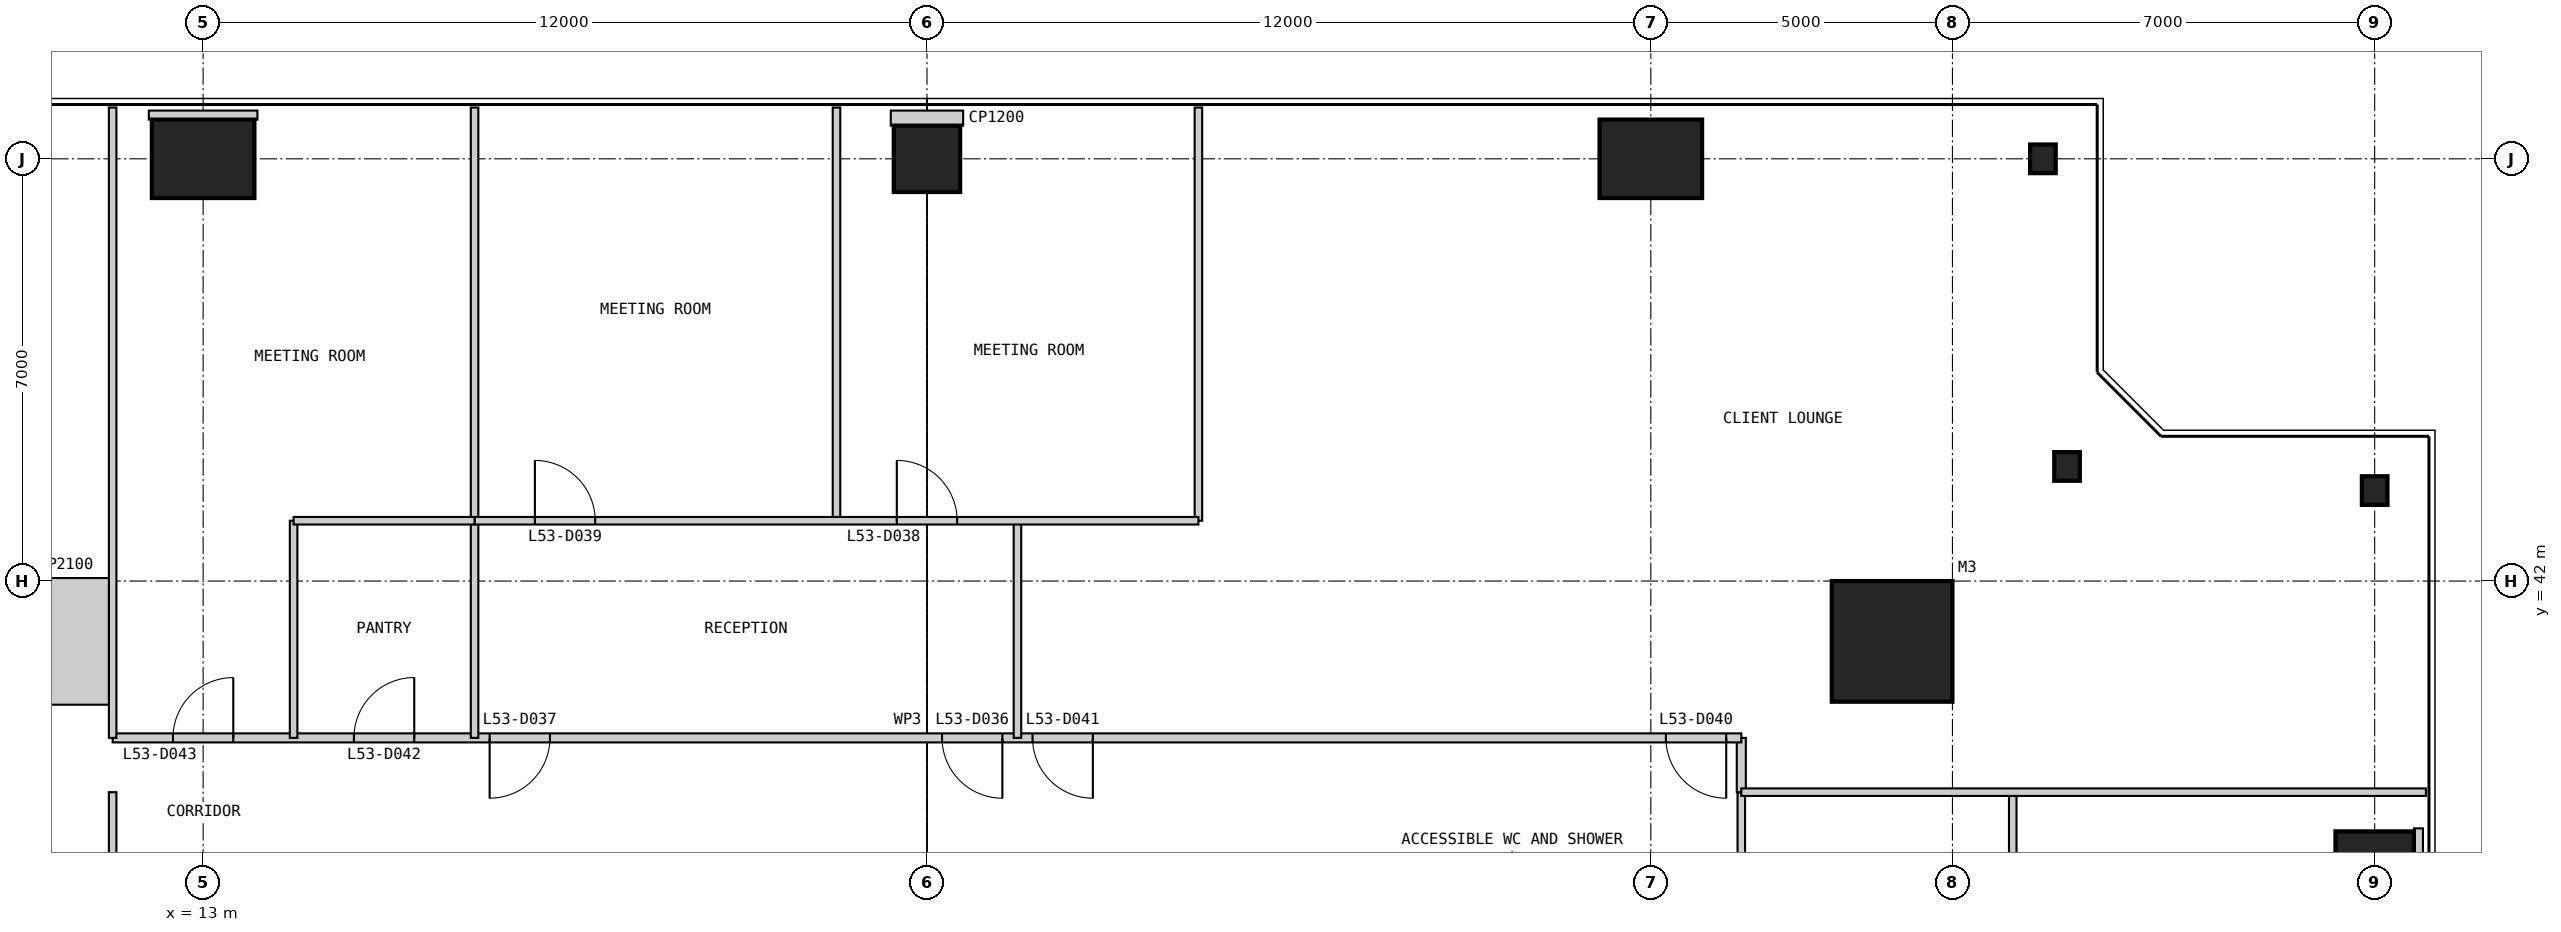
"""IFC4 building model, lengths in metres.
Left out: names, types, materials, properties, quantities, classifications, styles, units other than length and angle.
Written with IfcOpenShell. Run it as: python <this file> out.ifc"""

import sys

from ifc_helpers import new_model, si_unit, direction, frame, frame_2d, origin, origin_2d, place, context, subcontext, project, spatial, rectangle, i_section, extrude, element, fill, save


model = new_model("IFC4")
c1 = context("Model", 3, precision=1e-05, world=origin(), true_north=direction((0.0, 1.0)))
c2 = subcontext(c1, "Body", "Model", "MODEL_VIEW")
j1 = project(units=[si_unit("LENGTHUNIT", "METRE"), si_unit("PLANEANGLEUNIT", "RADIAN")], contexts=[c1])
p1 = place(None, origin())
s1 = spatial("IfcSite", under=j1, at=p1, CompositionType="ELEMENT")
p2 = place(p1, origin())
s2 = spatial("IfcBuilding", under=s1, at=p2, CompositionType="ELEMENT")
p3 = place(p2, frame((0.0, 0.0, 225.8)))
s3 = spatial("IfcBuildingStorey", under=s2, at=p3, CompositionType="ELEMENT", Elevation=225.8)
p4 = place(p3, frame((41.0, 41.0, 0.0), z_axis=(0.0, 0.0, 1.0), x_axis=(1.0, 0.0, 0.0)))
e1 = element("IfcColumn", 1, at=p4, inside=s3, PredefinedType="COLUMN", context=c2, shape_type="SweptSolid", body=[
    extrude(rectangle(XDim=2.0, YDim=2.0, at=origin_2d()), origin(), (0.0, 0.0, 1.0), 4.0),
])
p5 = place(p3, frame((49.0, 37.0, 0.0), z_axis=(0.0, 0.0, 1.0), x_axis=(1.0, 0.0, 0.0)))
e2 = element("IfcColumn", 2, at=p5, inside=s3, PredefinedType="COLUMN", context=c2, shape_type="SweptSolid", body=[
    extrude(rectangle(XDim=1.3, YDim=1.7, at=origin_2d()), origin(), (0.0, 0.0, 1.0), 4.0),
])
for number, where, z_axis, x_axis in (
    (3, (49.0, 43.5, 0.0), (0.0, 0.0, 1.0), (1.0, 0.0, 0.0)),
    (4, (43.9, 43.9, 0.0), (0.0, 0.0, 1.0), (1.0, 0.0, 0.0)),
    (5, (43.5, 49.0, 0.0), (0.0, 0.0, 1.0), (1.0, 0.0, 0.0)),
):
    element("IfcColumn", number, at=place(p3, frame(where, z_axis=z_axis, x_axis=x_axis)), inside=s3, PredefinedType="COLUMN", context=c2, shape_type="SweptSolid", body=[
        extrude(i_section(OverallWidth=0.424, OverallDepth=0.475, WebThickness=0.048, FlangeThickness=0.077, at=origin_2d()), origin(), (0.0, 0.0, 1.0), 4.0),
    ])
p6 = place(p3, frame((37.0, 49.0, 0.0), z_axis=(0.0, 0.0, 1.0), x_axis=(1.0, 0.0, 0.0)))
e6 = element("IfcColumn", 6, at=p6, inside=s3, PredefinedType="COLUMN", context=c2, shape_type="SweptSolid", body=[
    extrude(rectangle(XDim=1.7, YDim=1.3, at=origin_2d()), origin(), (0.0, 0.0, 1.0), 4.0),
])
p7 = place(p3, frame((25.0, 49.0, 0.0), z_axis=(0.0, 0.0, 1.0), x_axis=(1.0, 0.0, 0.0)))
e7 = element("IfcColumn", 7, at=p7, inside=s3, PredefinedType="COLUMN", context=c2, shape_type="SweptSolid", body=[
    extrude(rectangle(XDim=1.1, YDim=1.1, at=origin_2d()), origin(), (0.0, 0.0, 1.0), 4.0),
])
p8 = place(p3, frame((13.0, 49.0, 0.0), z_axis=(0.0, 0.0, 1.0), x_axis=(1.0, 0.0, 0.0)))
e8 = element("IfcColumn", 8, at=p8, inside=s3, PredefinedType="COLUMN", context=c2, shape_type="SweptSolid", body=[
    extrude(rectangle(XDim=1.7, YDim=1.3, at=origin_2d()), origin(), (0.0, 0.0, 1.0), 4.0),
])
p9 = place(p3, frame((43.0, 14.5, 0.0), z_axis=(0.0, 0.0, 1.0), x_axis=(0.0, 1.0, 0.0)))
e9 = element("IfcWall", 9, at=p9, inside=s3, PredefinedType="PARTITIONING", context=c2, shape_type="SweptSolid", body=[
    extrude(rectangle(XDim=24.0, YDim=0.125, at=frame_2d((12.0, 0.0))), origin(), (0.0, 0.0, 1.0), 3.238),
])
p10 = place(p9, frame((4.05, 0.0, 0.0)))
e10 = element("IfcOpeningElement", 10, at=p10, cuts=e9, PredefinedType="OPENING", context=c2, shape_type="SweptSolid", body=[
    extrude(rectangle(XDim=0.9, YDim=2.2, at=frame_2d((0.45, 1.1))), frame((0.0, 0.073, 0.0), z_axis=(0.0, -1.0, 0.0), x_axis=(1.0, 0.0, 0.0)), (0.0, 0.0, 1.0), 0.145),
])
p11 = place(p9, frame((10.05, 0.0, 0.0)))
e11 = element("IfcOpeningElement", 11, at=p11, cuts=e9, PredefinedType="OPENING", context=c2, shape_type="SweptSolid", body=[
    extrude(rectangle(XDim=0.9, YDim=2.2, at=frame_2d((0.45, 1.1))), frame((0.0, 0.073, 0.0), z_axis=(0.0, -1.0, 0.0), x_axis=(1.0, 0.0, 0.0)), (0.0, 0.0, 1.0), 0.145),
])
p12 = place(p9, frame((16.05, 0.0, 0.0)))
e12 = element("IfcOpeningElement", 12, at=p12, cuts=e9, PredefinedType="OPENING", context=c2, shape_type="SweptSolid", body=[
    extrude(rectangle(XDim=0.9, YDim=2.2, at=frame_2d((0.45, 1.1))), frame((0.0, 0.073, 0.0), z_axis=(0.0, -1.0, 0.0), x_axis=(1.0, 0.0, 0.0)), (0.0, 0.0, 1.0), 0.145),
])
p13 = place(p9, frame((19.05, 0.0, 0.0)))
e13 = element("IfcOpeningElement", 13, at=p13, cuts=e9, PredefinedType="OPENING", context=c2, shape_type="SweptSolid", body=[
    extrude(rectangle(XDim=0.9, YDim=2.2, at=frame_2d((0.45, 1.1))), frame((0.0, 0.073, 0.0), z_axis=(0.0, -1.0, 0.0), x_axis=(1.0, 0.0, 0.0)), (0.0, 0.0, 1.0), 0.145),
])
p14 = place(p3, frame((38.5, 35.5, 0.0), z_axis=(0.0, 0.0, 1.0), x_axis=(0.0, 1.0, 0.0)))
e14 = element("IfcWall", 14, at=p14, inside=s3, PredefinedType="PARTITIONING", context=c2, shape_type="SweptSolid", body=[
    extrude(rectangle(XDim=3.0, YDim=0.125, at=frame_2d((1.5, 0.0))), origin(), (0.0, 0.0, 1.0), 3.85),
])
p15 = place(p3, frame((38.5, 38.5, 0.0), z_axis=(0.0, 0.0, 1.0), x_axis=(0.0, 1.0, 0.0)))
e15 = element("IfcWall", 15, at=p15, inside=s3, PredefinedType="PARTITIONING", context=c2, shape_type="SweptSolid", body=[
    extrude(rectangle(XDim=0.9, YDim=0.15, at=frame_2d((0.45, 0.0))), origin(), (0.0, 0.0, 1.0), 3.85),
])
p16 = place(p3, frame((38.5, 39.4, 0.0), z_axis=(0.0, 0.0, 1.0), x_axis=(-1.0, 0.0, 0.0)))
e16 = element("IfcWall", 16, at=p16, inside=s3, PredefinedType="PARTITIONING", context=c2, shape_type="SweptSolid", body=[
    extrude(rectangle(XDim=27.0, YDim=0.15, at=frame_2d((13.5, 0.0))), origin(), (0.0, 0.0, 1.0), 3.85),
])
p17 = place(p16, frame((12.25, 0.0, 0.0)))
e17 = element("IfcOpeningElement", 17, at=p17, cuts=e16, PredefinedType="OPENING", context=c2, shape_type="SweptSolid", body=[
    extrude(rectangle(XDim=1.0, YDim=2.2, at=frame_2d((0.5, 1.1))), frame((0.0, 0.085, 0.0), z_axis=(0.0, -1.0, 0.0), x_axis=(1.0, 0.0, 0.0)), (0.0, 0.0, 1.0), 0.17),
])
p18 = place(p16, frame((19.75, 0.0, 0.0)))
e18 = element("IfcOpeningElement", 18, at=p18, cuts=e16, PredefinedType="OPENING", context=c2, shape_type="SweptSolid", body=[
    extrude(rectangle(XDim=1.0, YDim=2.2, at=frame_2d((0.5, 1.1))), frame((0.0, 0.085, 0.0), z_axis=(0.0, -1.0, 0.0), x_axis=(1.0, 0.0, 0.0)), (0.0, 0.0, 1.0), 0.17),
])
p19 = place(p16, frame((0.25, 0.0, 0.0)))
e19 = element("IfcOpeningElement", 19, at=p19, cuts=e16, PredefinedType="OPENING", context=c2, shape_type="SweptSolid", body=[
    extrude(rectangle(XDim=1.0, YDim=2.2, at=frame_2d((0.5, 1.1))), frame((0.0, 0.085, 0.0), z_axis=(0.0, -1.0, 0.0), x_axis=(1.0, 0.0, 0.0)), (0.0, 0.0, 1.0), 0.17),
])
p20 = place(p16, frame((10.75, 0.0, 0.0)))
e20 = element("IfcOpeningElement", 20, at=p20, cuts=e16, PredefinedType="OPENING", context=c2, shape_type="SweptSolid", body=[
    extrude(rectangle(XDim=1.0, YDim=2.2, at=frame_2d((0.5, 1.1))), frame((0.0, 0.085, 0.0), z_axis=(0.0, -1.0, 0.0), x_axis=(1.0, 0.0, 0.0)), (0.0, 0.0, 1.0), 0.17),
])
p21 = place(p16, frame((22.0, 0.0, 0.0)))
e21 = element("IfcOpeningElement", 21, at=p21, cuts=e16, PredefinedType="OPENING", context=c2, shape_type="SweptSolid", body=[
    extrude(rectangle(XDim=1.0, YDim=2.2, at=frame_2d((0.5, 1.1))), frame((0.0, 0.085, 0.0), z_axis=(0.0, -1.0, 0.0), x_axis=(1.0, 0.0, 0.0)), (0.0, 0.0, 1.0), 0.17),
])
p22 = place(p16, frame((25.0, 0.0, 0.0)))
e22 = element("IfcOpeningElement", 22, at=p22, cuts=e16, PredefinedType="OPENING", context=c2, shape_type="SweptSolid", body=[
    extrude(rectangle(XDim=1.0, YDim=2.2, at=frame_2d((0.5, 1.1))), frame((0.0, 0.085, 0.0), z_axis=(0.0, -1.0, 0.0), x_axis=(1.0, 0.0, 0.0)), (0.0, 0.0, 1.0), 0.17),
])
p23 = place(p3, frame((49.85, 38.5, 0.0), z_axis=(0.0, 0.0, 1.0), x_axis=(-1.0, 0.0, 0.0)))
e23 = element("IfcWall", 23, at=p23, inside=s3, PredefinedType="PARTITIONING", context=c2, shape_type="SweptSolid", body=[
    extrude(rectangle(XDim=11.35, YDim=0.125, at=frame_2d((5.675, 0.0))), origin(), (0.0, 0.0, 1.0), 3.85),
])
p24 = place(p3, frame((29.5, 49.85, 0.0), z_axis=(0.0, 0.0, 1.0), x_axis=(0.0, -1.0, 0.0)))
e24 = element("IfcWall", 24, at=p24, inside=s3, PredefinedType="PARTITIONING", context=c2, shape_type="SweptSolid", body=[
    extrude(rectangle(XDim=6.85, YDim=0.125, at=frame_2d((3.425, 0.0))), origin(), (0.0, 0.0, 1.0), 3.85),
])
p25 = place(p3, frame((26.5, 43.0, 0.0), z_axis=(0.0, 0.0, 1.0), x_axis=(0.0, -1.0, 0.0)))
e25 = element("IfcWall", 25, at=p25, inside=s3, PredefinedType="PARTITIONING", context=c2, shape_type="SweptSolid", body=[
    extrude(rectangle(XDim=3.6, YDim=0.125, at=frame_2d((1.8, 0.0))), origin(), (0.0, 0.0, 1.0), 3.85),
])
p26 = place(p3, frame((23.5, 49.85, 0.0), z_axis=(0.0, 0.0, 1.0), x_axis=(0.0, -1.0, 0.0)))
e26 = element("IfcWall", 26, at=p26, inside=s3, PredefinedType="PARTITIONING", context=c2, shape_type="SweptSolid", body=[
    extrude(rectangle(XDim=6.85, YDim=0.125, at=frame_2d((3.425, 0.0))), origin(), (0.0, 0.0, 1.0), 3.85),
])
p27 = place(p3, frame((17.5, 49.85, 0.0), z_axis=(0.0, 0.0, 1.0), x_axis=(0.0, -1.0, 0.0)))
e27 = element("IfcWall", 27, at=p27, inside=s3, PredefinedType="PARTITIONING", context=c2, shape_type="SweptSolid", body=[
    extrude(rectangle(XDim=10.45, YDim=0.125, at=frame_2d((5.225, 0.0))), origin(), (0.0, 0.0, 1.0), 3.85),
])
p28 = place(p3, frame((14.5, 43.0, 0.0), z_axis=(0.0, 0.0, 1.0), x_axis=(0.0, -1.0, 0.0)))
e28 = element("IfcWall", 28, at=p28, inside=s3, PredefinedType="PARTITIONING", context=c2, shape_type="SweptSolid", body=[
    extrude(rectangle(XDim=3.6, YDim=0.125, at=frame_2d((1.8, 0.0))), origin(), (0.0, 0.0, 1.0), 3.85),
])
p29 = place(p3, frame((29.5, 43.0, 0.0), z_axis=(0.0, 0.0, 1.0), x_axis=(-1.0, 0.0, 0.0)))
e29 = element("IfcWall", 29, at=p29, inside=s3, PredefinedType="PARTITIONING", context=c2, shape_type="SweptSolid", body=[
    extrude(rectangle(XDim=12.0, YDim=0.125, at=frame_2d((6.0, 0.0))), origin(), (0.0, 0.0, 1.0), 3.85),
])
p30 = place(p29, frame((4.0, 0.0, 0.0)))
e30 = element("IfcOpeningElement", 30, at=p30, cuts=e29, PredefinedType="OPENING", context=c2, shape_type="SweptSolid", body=[
    extrude(rectangle(XDim=1.0, YDim=2.2, at=frame_2d((0.5, 1.1))), frame((0.0, 0.073, 0.0), z_axis=(0.0, -1.0, 0.0), x_axis=(1.0, 0.0, 0.0)), (0.0, 0.0, 1.0), 0.145),
])
p31 = place(p29, frame((10.0, 0.0, 0.0)))
e31 = element("IfcOpeningElement", 31, at=p31, cuts=e29, PredefinedType="OPENING", context=c2, shape_type="SweptSolid", body=[
    extrude(rectangle(XDim=1.0, YDim=2.2, at=frame_2d((0.5, 1.1))), frame((0.0, 0.073, 0.0), z_axis=(0.0, -1.0, 0.0), x_axis=(1.0, 0.0, 0.0)), (0.0, 0.0, 1.0), 0.145),
])
p32 = place(p3, frame((17.5, 43.0, 0.0), z_axis=(0.0, 0.0, 1.0), x_axis=(-1.0, 0.0, 0.0)))
e32 = element("IfcWall", 32, at=p32, inside=s3, PredefinedType="PARTITIONING", context=c2, shape_type="SweptSolid", body=[
    extrude(rectangle(XDim=3.0, YDim=0.125, at=frame_2d((1.5, 0.0))), origin(), (0.0, 0.0, 1.0), 3.85),
])
p33 = place(p3, frame((11.5, 49.85, 0.0), z_axis=(0.0, 0.0, 1.0), x_axis=(0.0, -1.0, 0.0)))
e33 = element("IfcWall", 33, at=p33, inside=s3, PredefinedType="PARTITIONING", context=c2, shape_type="SweptSolid", body=[
    extrude(rectangle(XDim=10.45, YDim=0.125, at=frame_2d((5.225, 0.0))), origin(), (0.0, 0.0, 1.0), 3.85),
])
p34 = place(p3, frame((11.5, 38.5, 0.0), z_axis=(0.0, 0.0, 1.0), x_axis=(0.0, -1.0, 0.0)))
e34 = element("IfcWall", 34, at=p34, inside=s3, PredefinedType="PARTITIONING", context=c2, shape_type="SweptSolid", body=[
    extrude(rectangle(XDim=3.0, YDim=0.125, at=frame_2d((1.5, 0.0))), origin(), (0.0, 0.0, 1.0), 3.85),
])
p35 = place(p3, frame((49.8, 37.0, 0.0), z_axis=(0.0, 0.0, 1.0), x_axis=(-1.0, 0.0, 0.0)))
e35 = element("IfcWall", 35, at=p35, inside=s3, PredefinedType="PARTITIONING", context=c2, shape_type="SweptSolid", body=[
    extrude(rectangle(XDim=0.15, YDim=1.8, at=frame_2d((0.075, 0.0))), origin(), (0.0, 0.0, 1.0), 3.85),
])
p36 = place(p3, frame((25.0, 49.8, 0.0), z_axis=(0.0, 0.0, 1.0), x_axis=(0.0, -1.0, 0.0)))
e36 = element("IfcWall", 36, at=p36, inside=s3, PredefinedType="PARTITIONING", context=c2, shape_type="SweptSolid", body=[
    extrude(rectangle(XDim=0.25, YDim=1.2, at=frame_2d((0.125, 0.0))), origin(), (0.0, 0.0, 1.0), 3.85),
])
p37 = place(p3, frame((13.0, 49.8, 0.0), z_axis=(0.0, 0.0, 1.0), x_axis=(0.0, -1.0, 0.0)))
e37 = element("IfcWall", 37, at=p37, inside=s3, PredefinedType="PARTITIONING", context=c2, shape_type="SweptSolid", body=[
    extrude(rectangle(XDim=0.15, YDim=1.8, at=frame_2d((0.075, 0.0))), origin(), (0.0, 0.0, 1.0), 3.85),
])
p38 = place(p3, frame((11.438, 41.0, 0.0), z_axis=(0.0, 0.0, 1.0), x_axis=(-1.0, 0.0, 0.0)))
e38 = element("IfcWall", 38, at=p38, inside=s3, PredefinedType="PARTITIONING", context=c2, shape_type="SweptSolid", body=[
    extrude(rectangle(XDim=1.438, YDim=2.1, at=frame_2d((0.719, 0.0))), origin(), (0.0, 0.0, 1.0), 3.85),
])
p39 = place(p17, origin())
e39 = element("IfcDoor", 39, at=p39, inside=s3, OperationType="SINGLE_SWING_LEFT", PredefinedType="DOOR", context=c2, shape_type="SweptSolid", body=[
    extrude(rectangle(XDim=1.0, YDim=2.2, at=frame_2d((0.5, 1.1))), frame((0.0, 0.025, 0.0), z_axis=(0.0, -1.0, 0.0), x_axis=(1.0, 0.0, 0.0)), (0.0, 0.0, 1.0), 0.05),
])
fill(e17, e39)
p40 = place(p18, origin())
e40 = element("IfcDoor", 40, at=p40, inside=s3, OperationType="SINGLE_SWING_RIGHT", PredefinedType="DOOR", context=c2, shape_type="SweptSolid", body=[
    extrude(rectangle(XDim=1.0, YDim=2.2, at=frame_2d((0.5, 1.1))), frame((0.0, 0.025, 0.0), z_axis=(0.0, -1.0, 0.0), x_axis=(1.0, 0.0, 0.0)), (0.0, 0.0, 1.0), 0.05),
])
fill(e18, e40)
p41 = place(p30, frame((1.0, 0.0, 0.0), z_axis=(0.0, 0.0, 1.0), x_axis=(-1.0, 0.0, 0.0)))
e41 = element("IfcDoor", 41, at=p41, inside=s3, OperationType="SINGLE_SWING_LEFT", PredefinedType="DOOR", context=c2, shape_type="SweptSolid", body=[
    extrude(rectangle(XDim=1.0, YDim=2.2, at=frame_2d((0.5, 1.1))), frame((0.0, 0.025, 0.0), z_axis=(0.0, -1.0, 0.0), x_axis=(1.0, 0.0, 0.0)), (0.0, 0.0, 1.0), 0.05),
])
fill(e30, e41)
p42 = place(p31, frame((1.0, 0.0, 0.0), z_axis=(0.0, 0.0, 1.0), x_axis=(-1.0, 0.0, 0.0)))
e42 = element("IfcDoor", 42, at=p42, inside=s3, OperationType="SINGLE_SWING_LEFT", PredefinedType="DOOR", context=c2, shape_type="SweptSolid", body=[
    extrude(rectangle(XDim=1.0, YDim=2.2, at=frame_2d((0.5, 1.1))), frame((0.0, 0.025, 0.0), z_axis=(0.0, -1.0, 0.0), x_axis=(1.0, 0.0, 0.0)), (0.0, 0.0, 1.0), 0.05),
])
fill(e31, e42)
p43 = place(p19, origin())
e43 = element("IfcDoor", 43, at=p43, inside=s3, OperationType="SINGLE_SWING_LEFT", PredefinedType="DOOR", context=c2, shape_type="SweptSolid", body=[
    extrude(rectangle(XDim=1.0, YDim=2.2, at=frame_2d((0.5, 1.1))), frame((0.0, 0.025, 0.0), z_axis=(0.0, -1.0, 0.0), x_axis=(1.0, 0.0, 0.0)), (0.0, 0.0, 1.0), 0.05),
])
fill(e19, e43)
p44 = place(p20, origin())
e44 = element("IfcDoor", 44, at=p44, inside=s3, OperationType="SINGLE_SWING_LEFT", PredefinedType="DOOR", context=c2, shape_type="SweptSolid", body=[
    extrude(rectangle(XDim=1.0, YDim=2.2, at=frame_2d((0.5, 1.1))), frame((0.0, 0.025, 0.0), z_axis=(0.0, -1.0, 0.0), x_axis=(1.0, 0.0, 0.0)), (0.0, 0.0, 1.0), 0.05),
])
fill(e20, e44)
p45 = place(p21, frame((1.0, 0.0, 0.0), z_axis=(0.0, 0.0, 1.0), x_axis=(-1.0, 0.0, 0.0)))
e45 = element("IfcDoor", 45, at=p45, inside=s3, OperationType="SINGLE_SWING_RIGHT", PredefinedType="DOOR", context=c2, shape_type="SweptSolid", body=[
    extrude(rectangle(XDim=1.0, YDim=2.2, at=frame_2d((0.5, 1.1))), frame((0.0, 0.025, 0.0), z_axis=(0.0, -1.0, 0.0), x_axis=(1.0, 0.0, 0.0)), (0.0, 0.0, 1.0), 0.05),
])
fill(e21, e45)
p46 = place(p22, frame((1.0, 0.0, 0.0), z_axis=(0.0, 0.0, 1.0), x_axis=(-1.0, 0.0, 0.0)))
e46 = element("IfcDoor", 46, at=p46, inside=s3, OperationType="SINGLE_SWING_RIGHT", PredefinedType="DOOR", context=c2, shape_type="SweptSolid", body=[
    extrude(rectangle(XDim=1.0, YDim=2.2, at=frame_2d((0.5, 1.1))), frame((0.0, 0.025, 0.0), z_axis=(0.0, -1.0, 0.0), x_axis=(1.0, 0.0, 0.0)), (0.0, 0.0, 1.0), 0.05),
])
fill(e22, e46)
save(model, sys.argv[1])
